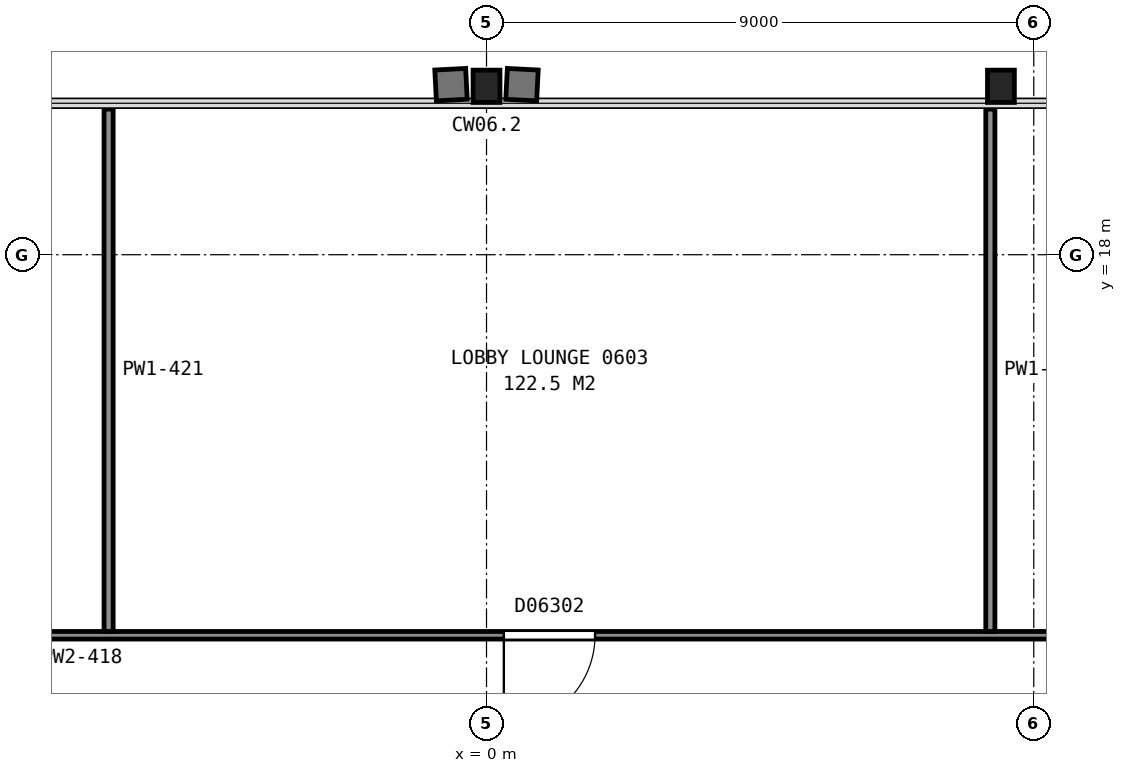
"""IFC4 building model, lengths in metres.
Left out: names, types, materials, properties, quantities, classifications, styles, units other than length and angle.
Written with IfcOpenShell. Run it as: python <this file> out.ifc"""

import sys

from ifc_helpers import new_model, si_unit, direction, frame, frame_2d, origin, origin_2d, place, context, subcontext, project, spatial, rectangle, i_section, extrude, element, fill, save


model = new_model("IFC4")
c1 = context("Model", 3, precision=1e-05, world=origin(), true_north=direction((0.0, 1.0)))
c2 = subcontext(c1, "Body", "Model", "MODEL_VIEW")
j1 = project(units=[si_unit("LENGTHUNIT", "METRE"), si_unit("PLANEANGLEUNIT", "RADIAN")], contexts=[c1])
p1 = place(None, origin())
s1 = spatial("IfcSite", under=j1, at=p1, CompositionType="ELEMENT")
p2 = place(p1, origin())
s2 = spatial("IfcBuilding", under=s1, at=p2, CompositionType="ELEMENT")
p3 = place(p2, frame((0.0, 0.0, 36.8)))
s3 = spatial("IfcBuildingStorey", under=s2, at=p3, CompositionType="ELEMENT", Elevation=36.8)
for number, where, z_axis, x_axis in (
    (1, (8.46, 20.77, 0.025), (0.0, 0.0, 1.0), (1.0, 0.0, 0.0)),
    (2, (0.0, 20.77, 0.025), (0.0, 0.0, 1.0), (1.0, 0.0, 0.0)),
):
    element("IfcColumn", number, at=place(p3, frame(where, z_axis=z_axis, x_axis=x_axis)), inside=s3, PredefinedType="COLUMN", context=c2, shape_type="SweptSolid", body=[
        extrude(i_section(OverallWidth=0.442, OverallDepth=0.531, WebThickness=0.066, FlangeThickness=0.106, FilletRadius=0.015, at=origin_2d()), origin(), (0.0, 0.0, 1.0), 3.575),
    ])
for number, where, z_axis, x_axis in (
    (3, (6.178, 5.299, 0.0), (0.0, 0.0, 1.0), (0.866, 0.5, 0.0)),
    (4, (-6.178, 5.299, 0.0), (0.0, 0.0, 1.0), (-0.866, 0.5, 0.0)),
):
    element("IfcWall", number, at=place(p3, frame(where, z_axis=z_axis, x_axis=x_axis)), inside=s3, PredefinedType="PARTITIONING", context=c2, shape_type="SweptSolid", body=[
        extrude(rectangle(XDim=12.0, YDim=0.2, at=frame_2d((6.0, 0.0))), origin(), (0.0, 0.0, 1.0), 3.35),
    ])
p4 = place(p3, frame((-13.598, 11.741, 0.0), z_axis=(0.0, 0.0, 1.0), x_axis=(1.0, 0.0, 0.0)))
e5 = element("IfcWall", 5, at=p4, inside=s3, PredefinedType="PARTITIONING", context=c2, shape_type="SweptSolid", body=[
    extrude(rectangle(XDim=27.197, YDim=0.125, at=frame_2d((13.598, 0.0))), origin(), (0.0, 0.0, 1.0), 2.613),
])
p5 = place(p4, frame((13.884, 0.0, 0.0)))
e6 = element("IfcOpeningElement", 6, at=p5, cuts=e5, PredefinedType="OPENING", context=c2, shape_type="SweptSolid", body=[
    extrude(rectangle(XDim=1.5, YDim=2.1, at=frame_2d((0.75, 1.05))), frame((0.0, 0.073, 0.0), z_axis=(0.0, -1.0, 0.0), x_axis=(1.0, 0.0, 0.0)), (0.0, 0.0, 1.0), 0.145),
])
for number, where, z_axis, x_axis in (
    (7, (-6.215, 11.803, 0.0), (0.0, 0.0, 1.0), (0.0, 1.0, 0.0)),
    (8, (8.286, 11.803, 0.0), (0.0, 0.0, 1.0), (0.0, 1.0, 0.0)),
):
    element("IfcWall", number, at=place(p3, frame(where, z_axis=z_axis, x_axis=x_axis)), inside=s3, PredefinedType="PARTITIONING", context=c2, shape_type="SweptSolid", body=[
        extrude(rectangle(XDim=8.592, YDim=0.15, at=frame_2d((4.296, 0.0))), origin(), (0.0, 0.0, 1.0), 2.613),
    ])
p6 = place(p5, origin())
e9 = element("IfcDoor", 9, at=p6, inside=s3, OperationType="DOUBLE_DOOR_SINGLE_SWING", PredefinedType="DOOR", context=c2, shape_type="SweptSolid", body=[
    extrude(rectangle(XDim=1.5, YDim=2.1, at=frame_2d((0.75, 1.05))), frame((0.0, 0.025, 0.0), z_axis=(0.0, -1.0, 0.0), x_axis=(1.0, 0.0, 0.0)), (0.0, 0.0, 1.0), 0.05),
])
fill(e6, e9)
save(model, sys.argv[1])
